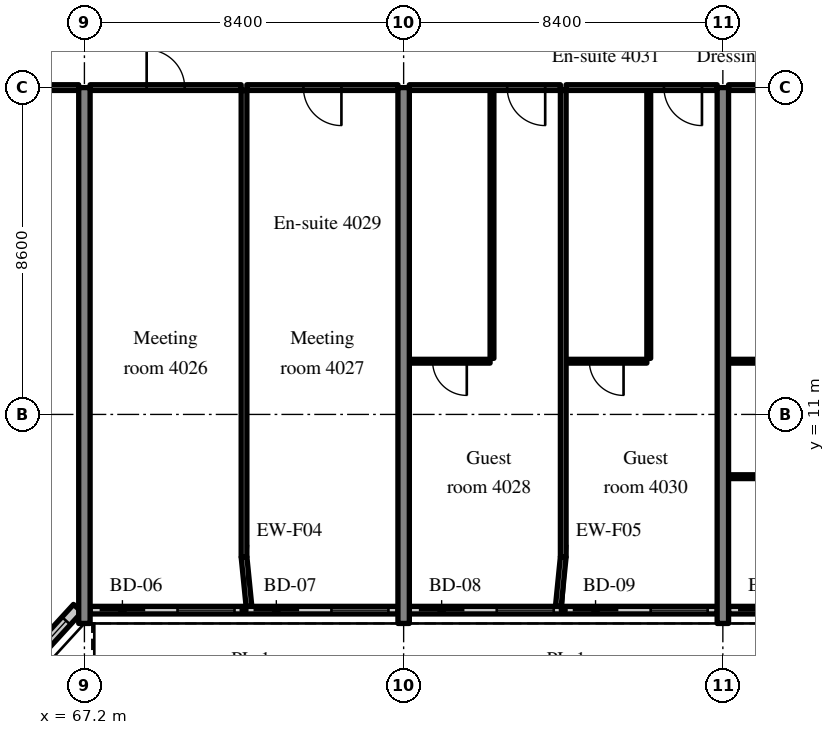
"""IFC4 building model, lengths in metres.
Left out: names, types, materials, properties, quantities, classifications, styles, units other than length and angle.
Written with IfcOpenShell. Run it as: python <this file> out.ifc"""

import sys

from ifc_helpers import new_model, si_unit, direction, frame, frame_2d, origin, place, context, subcontext, project, spatial, rectangle, extrude, source, transform, mapped, element, fill, save


model = new_model("IFC4")
c1 = context("Model", 3, precision=1e-05, world=origin(), true_north=direction((0.0, 1.0)))
c2 = subcontext(c1, "Body", "Model", "MODEL_VIEW")
j1 = project(units=[si_unit("LENGTHUNIT", "METRE"), si_unit("PLANEANGLEUNIT", "RADIAN")], contexts=[c1])
p1 = place(None, origin())
s1 = spatial("IfcSite", under=j1, at=p1, CompositionType="ELEMENT")
p2 = place(p1, origin())
s2 = spatial("IfcBuilding", under=s1, at=p2, CompositionType="ELEMENT")
p3 = place(p2, frame((0.0, 0.0, 166.8)))
s3 = spatial("IfcBuildingStorey", under=s2, at=p3, CompositionType="ELEMENT", Elevation=166.8)
m1 = source(origin(), c2, "Body", "SweptSolid", [
    extrude(rectangle(XDim=14.1, YDim=0.3, at=frame_2d((7.05, 0.0))), origin(), (0.0, 0.0, 1.0), 3.52),
])
for number, where, z_axis, x_axis in (
    (1, (67.2, 5.5, 0.0), (0.0, 0.0, 1.0), (0.0, 1.0, 0.0)),
    (2, (75.6, 5.5, 0.0), (0.0, 0.0, 1.0), (0.0, 1.0, 0.0)),
    (3, (84.0, 5.5, 0.0), (0.0, 0.0, 1.0), (0.0, 1.0, 0.0)),
):
    element("IfcWall", number, at=place(p3, frame(where, z_axis=z_axis, x_axis=x_axis)), inside=s3, PredefinedType="SHEAR", context=c2, shape_type="MappedRepresentation", body=[
        mapped(m1, transform((0.0, 0.0, 0.0), scale=1.0)),
    ])
m2 = source(origin(), c2, "Body", "SweptSolid", [
    extrude(rectangle(XDim=2.398, YDim=0.3, at=frame_2d((1.199, 0.0))), origin(), (0.0, 0.0, 1.0), 3.52),
])
p4 = place(p3, frame((65.404, 4.131, 0.0), z_axis=(0.0, 0.0, 1.0), x_axis=(0.675374189419, 0.737475222815, 0.0)))
e4 = element("IfcWall", 4, at=p4, inside=s3, PredefinedType="SOLIDWALL", context=c2, shape_type="MappedRepresentation", body=[
    mapped(m2, transform((0.0, 0.0, 0.0), scale=1.0)),
])
m3 = source(origin(), c2, "Body", "SweptSolid", [
    extrude(rectangle(XDim=1.5, YDim=2.0, at=frame_2d((0.75, 1.0))), frame((0.0, 0.16, 0.0), z_axis=(0.0, -1.0, 0.0), x_axis=(1.0, 0.0, 0.0)), (0.0, 0.0, 1.0), 0.32),
])
p5 = place(p4, frame((0.449, 0.0, 0.9)))
e5 = element("IfcOpeningElement", 5, at=p5, cuts=e4, PredefinedType="OPENING", context=c2, shape_type="MappedRepresentation", body=[
    mapped(m3, transform((0.0, 0.0, 0.0), scale=1.0)),
])
m4 = source(origin(), c2, "Body", "SweptSolid", [
    extrude(rectangle(XDim=8.1, YDim=0.2, at=frame_2d((4.05, 0.0))), origin(), (0.0, 0.0, 1.0), 2.87),
])
p6 = place(p3, frame((67.35, 5.85, 0.0), z_axis=(0.0, 0.0, 1.0), x_axis=(1.0, 0.0, 0.0)))
e6 = element("IfcWall", 6, at=p6, inside=s3, PredefinedType="SOLIDWALL", context=c2, shape_type="MappedRepresentation", body=[
    mapped(m4, transform((0.0, 0.0, 0.0), scale=1.0)),
])
m5 = source(origin(), c2, "Body", "SweptSolid", [
    extrude(rectangle(XDim=1.2, YDim=2.4, at=frame_2d((0.6, 1.2))), frame((0.0, 0.11, 0.0), z_axis=(0.0, -1.0, 0.0), x_axis=(1.0, 0.0, 0.0)), (0.0, 0.0, 1.0), 0.22),
])
p7 = place(p6, frame((0.25, 0.0, 0.0)))
e7 = element("IfcOpeningElement", 7, at=p7, cuts=e6, PredefinedType="OPENING", context=c2, shape_type="MappedRepresentation", body=[
    mapped(m5, transform((0.0, 0.0, 0.0), scale=1.0)),
])
m6 = source(origin(), c2, "Body", "SweptSolid", [
    extrude(rectangle(XDim=1.5, YDim=1.5, at=frame_2d((0.75, 0.75))), frame((0.0, 0.11, 0.0), z_axis=(0.0, -1.0, 0.0), x_axis=(1.0, 0.0, 0.0)), (0.0, 0.0, 1.0), 0.22),
])
p8 = place(p6, frame((2.3, 0.0, 0.9)))
e8 = element("IfcOpeningElement", 8, at=p8, cuts=e6, PredefinedType="OPENING", context=c2, shape_type="MappedRepresentation", body=[
    mapped(m6, transform((0.0, 0.0, 0.0), scale=1.0)),
])
p9 = place(p6, frame((4.3, 0.0, 0.0)))
e9 = element("IfcOpeningElement", 9, at=p9, cuts=e6, PredefinedType="OPENING", context=c2, shape_type="MappedRepresentation", body=[
    mapped(m5, transform((0.0, 0.0, 0.0), scale=1.0)),
])
p10 = place(p6, frame((6.35, 0.0, 0.9)))
e10 = element("IfcOpeningElement", 10, at=p10, cuts=e6, PredefinedType="OPENING", context=c2, shape_type="MappedRepresentation", body=[
    mapped(m6, transform((0.0, 0.0, 0.0), scale=1.0)),
])
m7 = source(origin(), c2, "Body", "SweptSolid", [
    extrude(rectangle(XDim=8.1, YDim=0.2, at=frame_2d((4.05, 0.0))), origin(), (0.0, 0.0, 1.0), 2.87),
])
p11 = place(p3, frame((75.75, 5.85, 0.0), z_axis=(0.0, 0.0, 1.0), x_axis=(1.0, 0.0, 0.0)))
e11 = element("IfcWall", 11, at=p11, inside=s3, PredefinedType="SOLIDWALL", context=c2, shape_type="MappedRepresentation", body=[
    mapped(m7, transform((0.0, 0.0, 0.0), scale=1.0)),
])
p12 = place(p11, frame((0.25, 0.0, 0.0)))
e12 = element("IfcOpeningElement", 12, at=p12, cuts=e11, PredefinedType="OPENING", context=c2, shape_type="MappedRepresentation", body=[
    mapped(m5, transform((0.0, 0.0, 0.0), scale=1.0)),
])
p13 = place(p11, frame((2.3, 0.0, 0.9)))
e13 = element("IfcOpeningElement", 13, at=p13, cuts=e11, PredefinedType="OPENING", context=c2, shape_type="MappedRepresentation", body=[
    mapped(m6, transform((0.0, 0.0, 0.0), scale=1.0)),
])
p14 = place(p11, frame((4.3, 0.0, 0.0)))
e14 = element("IfcOpeningElement", 14, at=p14, cuts=e11, PredefinedType="OPENING", context=c2, shape_type="MappedRepresentation", body=[
    mapped(m5, transform((0.0, 0.0, 0.0), scale=1.0)),
])
p15 = place(p11, frame((6.35, 0.0, 0.9)))
e15 = element("IfcOpeningElement", 15, at=p15, cuts=e11, PredefinedType="OPENING", context=c2, shape_type="MappedRepresentation", body=[
    mapped(m6, transform((0.0, 0.0, 0.0), scale=1.0)),
])
m8 = source(origin(), c2, "Body", "SweptSolid", [
    extrude(rectangle(XDim=4.105, YDim=0.2, at=frame_2d((2.052, 0.0))), origin(), (0.0, 0.0, 1.0), 2.87),
])
p16 = place(p3, frame((84.15, 5.85, 0.0), z_axis=(0.0, 0.0, 1.0), x_axis=(1.0, 0.0, 0.0)))
e16 = element("IfcWall", 16, at=p16, inside=s3, PredefinedType="SOLIDWALL", context=c2, shape_type="MappedRepresentation", body=[
    mapped(m8, transform((0.0, 0.0, 0.0), scale=1.0)),
])
p17 = place(p16, frame((0.25, 0.0, 0.0)))
e17 = element("IfcOpeningElement", 17, at=p17, cuts=e16, PredefinedType="OPENING", context=c2, shape_type="MappedRepresentation", body=[
    mapped(m5, transform((0.0, 0.0, 0.0), scale=1.0)),
])
p18 = place(p16, frame((2.355, 0.0, 0.9)))
e18 = element("IfcOpeningElement", 18, at=p18, cuts=e16, PredefinedType="OPENING", context=c2, shape_type="MappedRepresentation", body=[
    mapped(m6, transform((0.0, 0.0, 0.0), scale=1.0)),
])
m9 = source(origin(), c2, "Body", "SweptSolid", [
    extrude(rectangle(XDim=3.975, YDim=0.15, at=frame_2d((1.988, 0.0))), origin(), (0.0, 0.0, 1.0), 2.82),
])
p19 = place(p3, frame((63.075, 19.6, 0.0), z_axis=(0.0, 0.0, 1.0), x_axis=(1.0, 0.0, 0.0)))
e19 = element("IfcWall", 19, at=p19, inside=s3, PredefinedType="PARTITIONING", context=c2, shape_type="MappedRepresentation", body=[
    mapped(m9, transform((0.0, 0.0, 0.0), scale=1.0)),
])
m10 = source(origin(), c2, "Body", "SweptSolid", [
    extrude(rectangle(XDim=1.0, YDim=2.1, at=frame_2d((0.5, 1.05))), frame((0.0, 0.085, 0.0), z_axis=(0.0, -1.0, 0.0), x_axis=(1.0, 0.0, 0.0)), (0.0, 0.0, 1.0), 0.17),
])
p20 = place(p19, frame((1.487, 0.0, 0.0)))
e20 = element("IfcOpeningElement", 20, at=p20, cuts=e19, PredefinedType="OPENING", context=c2, shape_type="MappedRepresentation", body=[
    mapped(m10, transform((0.0, 0.0, 0.0), scale=1.0)),
])
m11 = source(origin(), c2, "Body", "SweptSolid", [
    extrude(rectangle(XDim=3.975, YDim=0.15, at=frame_2d((1.987, 0.0))), origin(), (0.0, 0.0, 1.0), 2.82),
])
p21 = place(p3, frame((67.35, 19.6, 0.0), z_axis=(0.0, 0.0, 1.0), x_axis=(1.0, 0.0, 0.0)))
e21 = element("IfcWall", 21, at=p21, inside=s3, PredefinedType="PARTITIONING", context=c2, shape_type="MappedRepresentation", body=[
    mapped(m11, transform((0.0, 0.0, 0.0), scale=1.0)),
])
p22 = place(p21, frame((1.488, 0.0, 0.0)))
e22 = element("IfcOpeningElement", 22, at=p22, cuts=e21, PredefinedType="OPENING", context=c2, shape_type="MappedRepresentation", body=[
    mapped(m10, transform((0.0, 0.0, 0.0), scale=1.0)),
])
p23 = place(p3, frame((71.475, 19.6, 0.0), z_axis=(0.0, 0.0, 1.0), x_axis=(1.0, 0.0, 0.0)))
e23 = element("IfcWall", 23, at=p23, inside=s3, PredefinedType="PARTITIONING", context=c2, shape_type="MappedRepresentation", body=[
    mapped(m11, transform((0.0, 0.0, 0.0), scale=1.0)),
])
p24 = place(p23, frame((1.488, 0.0, 0.0)))
e24 = element("IfcOpeningElement", 24, at=p24, cuts=e23, PredefinedType="OPENING", context=c2, shape_type="MappedRepresentation", body=[
    mapped(m10, transform((0.0, 0.0, 0.0), scale=1.0)),
])
m12 = source(origin(), c2, "Body", "SweptSolid", [
    extrude(rectangle(XDim=12.275, YDim=0.15, at=frame_2d((6.137, 0.0))), origin(), (0.0, 0.0, 1.0), 3.52),
])
p25 = place(p3, frame((71.4, 7.25, 0.0), z_axis=(0.0, 0.0, 1.0), x_axis=(0.0, 1.0, 0.0)))
e25 = element("IfcWall", 25, at=p25, inside=s3, PredefinedType="PARTITIONING", context=c2, shape_type="MappedRepresentation", body=[
    mapped(m12, transform((0.0, 0.0, 0.0), scale=1.0)),
])
m13 = source(origin(), c2, "Body", "SweptSolid", [
    extrude(rectangle(XDim=7.05, YDim=0.1, at=frame_2d((3.525, 0.0))), origin(), (0.0, 0.0, 1.0), 3.52),
])
p26 = place(p3, frame((77.925, 12.475, 0.0), z_axis=(0.0, 0.0, 1.0), x_axis=(0.0, 1.0, 0.0)))
e26 = element("IfcWall", 26, at=p26, inside=s3, PredefinedType="PARTITIONING", context=c2, shape_type="MappedRepresentation", body=[
    mapped(m13, transform((0.0, 0.0, 0.0), scale=1.0)),
])
m14 = source(origin(), c2, "Body", "SweptSolid", [
    extrude(rectangle(XDim=2.125, YDim=0.1, at=frame_2d((1.062, 0.0))), origin(), (0.0, 0.0, 1.0), 3.52),
])
p27 = place(p3, frame((75.75, 12.4, 0.0), z_axis=(0.0, 0.0, 1.0), x_axis=(1.0, 0.0, 0.0)))
e27 = element("IfcWall", 27, at=p27, inside=s3, PredefinedType="PARTITIONING", context=c2, shape_type="MappedRepresentation", body=[
    mapped(m14, transform((0.0, 0.0, 0.0), scale=1.0)),
])
m15 = source(origin(), c2, "Body", "SweptSolid", [
    extrude(rectangle(XDim=0.9, YDim=2.1, at=frame_2d((0.45, 1.05))), frame((0.0, 0.06, 0.0), z_axis=(0.0, -1.0, 0.0), x_axis=(1.0, 0.0, 0.0)), (0.0, 0.0, 1.0), 0.12),
])
p28 = place(p27, frame((0.612, 0.0, 0.0)))
e28 = element("IfcOpeningElement", 28, at=p28, cuts=e27, PredefinedType="OPENING", context=c2, shape_type="MappedRepresentation", body=[
    mapped(m15, transform((0.0, 0.0, 0.0), scale=1.0)),
])
p29 = place(p3, frame((75.75, 19.6, 0.0), z_axis=(0.0, 0.0, 1.0), x_axis=(1.0, 0.0, 0.0)))
e29 = element("IfcWall", 29, at=p29, inside=s3, PredefinedType="PARTITIONING", context=c2, shape_type="MappedRepresentation", body=[
    mapped(m9, transform((0.0, 0.0, 0.0), scale=1.0)),
])
p30 = place(p29, frame((2.575, 0.0, 0.0)))
e30 = element("IfcOpeningElement", 30, at=p30, cuts=e29, PredefinedType="OPENING", context=c2, shape_type="MappedRepresentation", body=[
    mapped(m10, transform((0.0, 0.0, 0.0), scale=1.0)),
])
p31 = place(p3, frame((82.05, 12.475, 0.0), z_axis=(0.0, 0.0, 1.0), x_axis=(0.0, 1.0, 0.0)))
e31 = element("IfcWall", 31, at=p31, inside=s3, PredefinedType="PARTITIONING", context=c2, shape_type="MappedRepresentation", body=[
    mapped(m13, transform((0.0, 0.0, 0.0), scale=1.0)),
])
p32 = place(p3, frame((79.875, 12.4, 0.0), z_axis=(0.0, 0.0, 1.0), x_axis=(1.0, 0.0, 0.0)))
e32 = element("IfcWall", 32, at=p32, inside=s3, PredefinedType="PARTITIONING", context=c2, shape_type="MappedRepresentation", body=[
    mapped(m14, transform((0.0, 0.0, 0.0), scale=1.0)),
])
p33 = place(p32, frame((0.612, 0.0, 0.0)))
e33 = element("IfcOpeningElement", 33, at=p33, cuts=e32, PredefinedType="OPENING", context=c2, shape_type="MappedRepresentation", body=[
    mapped(m15, transform((0.0, 0.0, 0.0), scale=1.0)),
])
p34 = place(p3, frame((79.875, 19.6, 0.0), z_axis=(0.0, 0.0, 1.0), x_axis=(1.0, 0.0, 0.0)))
e34 = element("IfcWall", 34, at=p34, inside=s3, PredefinedType="PARTITIONING", context=c2, shape_type="MappedRepresentation", body=[
    mapped(m9, transform((0.0, 0.0, 0.0), scale=1.0)),
])
p35 = place(p34, frame((2.575, 0.0, 0.0)))
e35 = element("IfcOpeningElement", 35, at=p35, cuts=e34, PredefinedType="OPENING", context=c2, shape_type="MappedRepresentation", body=[
    mapped(m10, transform((0.0, 0.0, 0.0), scale=1.0)),
])
p36 = place(p3, frame((79.8, 7.25, 0.0), z_axis=(0.0, 0.0, 1.0), x_axis=(0.0, 1.0, 0.0)))
e36 = element("IfcWall", 36, at=p36, inside=s3, PredefinedType="PARTITIONING", context=c2, shape_type="MappedRepresentation", body=[
    mapped(m12, transform((0.0, 0.0, 0.0), scale=1.0)),
])
m16 = source(origin(), c2, "Body", "SweptSolid", [
    extrude(rectangle(XDim=2.5, YDim=0.1, at=frame_2d((1.25, 0.0))), origin(), (0.0, 0.0, 1.0), 3.52),
])
p37 = place(p3, frame((84.15, 12.4, 0.0), z_axis=(0.0, 0.0, 1.0), x_axis=(1.0, 0.0, 0.0)))
e37 = element("IfcWall", 37, at=p37, inside=s3, PredefinedType="PARTITIONING", context=c2, shape_type="MappedRepresentation", body=[
    mapped(m16, transform((0.0, 0.0, 0.0), scale=1.0)),
])
p38 = place(p37, frame((0.8, 0.0, 0.0)))
e38 = element("IfcOpeningElement", 38, at=p38, cuts=e37, PredefinedType="OPENING", context=c2, shape_type="MappedRepresentation", body=[
    mapped(m15, transform((0.0, 0.0, 0.0), scale=1.0)),
])
m17 = source(origin(), c2, "Body", "SweptSolid", [
    extrude(rectangle(XDim=7.95, YDim=0.1, at=frame_2d((3.975, 0.0))), origin(), (0.0, 0.0, 1.0), 3.52),
])
p39 = place(p3, frame((84.15, 9.362, 0.0), z_axis=(0.0, 0.0, 1.0), x_axis=(1.0, 0.0, 0.0)))
e39 = element("IfcWall", 39, at=p39, inside=s3, PredefinedType="PARTITIONING", context=c2, shape_type="MappedRepresentation", body=[
    mapped(m17, transform((0.0, 0.0, 0.0), scale=1.0)),
])
m18 = source(origin(), c2, "Body", "SweptSolid", [
    extrude(rectangle(XDim=1.8, YDim=2.1, at=frame_2d((0.9, 1.05))), frame((0.0, 0.06, 0.0), z_axis=(0.0, -1.0, 0.0), x_axis=(1.0, 0.0, 0.0)), (0.0, 0.0, 1.0), 0.12),
])
p40 = place(p39, frame((3.075, 0.0, 0.0)))
e40 = element("IfcOpeningElement", 40, at=p40, cuts=e39, PredefinedType="OPENING", context=c2, shape_type="MappedRepresentation", body=[
    mapped(m18, transform((0.0, 0.0, 0.0), scale=1.0)),
])
m19 = source(origin(), c2, "Body", "SweptSolid", [
    extrude(rectangle(XDim=7.95, YDim=0.15, at=frame_2d((3.975, 0.0))), origin(), (0.0, 0.0, 1.0), 2.82),
])
p41 = place(p3, frame((84.15, 19.6, 0.0), z_axis=(0.0, 0.0, 1.0), x_axis=(1.0, 0.0, 0.0)))
e41 = element("IfcWall", 41, at=p41, inside=s3, PredefinedType="PARTITIONING", context=c2, shape_type="MappedRepresentation", body=[
    mapped(m19, transform((0.0, 0.0, 0.0), scale=1.0)),
])
p42 = place(p41, frame((6.55, 0.0, 0.0)))
e42 = element("IfcOpeningElement", 42, at=p42, cuts=e41, PredefinedType="OPENING", context=c2, shape_type="MappedRepresentation", body=[
    mapped(m10, transform((0.0, 0.0, 0.0), scale=1.0)),
])
m20 = source(origin(), c2, "Body", "SweptSolid", [
    extrude(rectangle(XDim=1.307, YDim=0.15, at=frame_2d((0.653, 0.0))), origin(), (0.0, 0.0, 1.0), 3.52),
])
for number, where, z_axis, x_axis in (
    (43, (71.53, 5.95, 0.0), (0.0, 0.0, 1.0), (-0.1, 0.995, 0.0)),
    (44, (79.67, 5.95, 0.0), (0.0, 0.0, 1.0), (0.1, 0.995, 0.0)),
):
    element("IfcWall", number, at=place(p3, frame(where, z_axis=z_axis, x_axis=x_axis)), inside=s3, PredefinedType="PARTITIONING", context=c2, shape_type="MappedRepresentation", body=[
        mapped(m20, transform((0.0, 0.0, 0.0), scale=1.0)),
    ])
m21 = source(origin(), c2, "Body", "SweptSolid", [
    extrude(rectangle(XDim=1.5, YDim=2.0, at=frame_2d((0.75, 1.0))), frame((0.0, 0.03, 0.0), z_axis=(0.0, -1.0, 0.0), x_axis=(1.0, 0.0, 0.0)), (0.0, 0.0, 1.0), 0.06),
])
p43 = place(p5, origin())
e45 = element("IfcWindow", 45, at=p43, inside=s3, PartitioningType="SINGLE_PANEL", PredefinedType="WINDOW", context=c2, shape_type="MappedRepresentation", body=[
    mapped(m21, transform((0.0, 0.0, 0.0), scale=1.0)),
])
fill(e5, e45)
m22 = source(origin(), c2, "Body", "SweptSolid", [
    extrude(rectangle(XDim=1.2, YDim=2.4, at=frame_2d((0.6, 1.2))), frame((0.0, 0.025, 0.0), z_axis=(0.0, -1.0, 0.0), x_axis=(1.0, 0.0, 0.0)), (0.0, 0.0, 1.0), 0.05),
])
p44 = place(p7, origin())
e46 = element("IfcDoor", 46, at=p44, inside=s3, OperationType="SLIDING_TO_RIGHT", PredefinedType="DOOR", context=c2, shape_type="MappedRepresentation", body=[
    mapped(m22, transform((0.0, 0.0, 0.0), scale=1.0)),
])
fill(e7, e46)
m23 = source(origin(), c2, "Body", "SweptSolid", [
    extrude(rectangle(XDim=1.5, YDim=1.5, at=frame_2d((0.75, 0.75))), frame((0.0, 0.03, 0.0), z_axis=(0.0, -1.0, 0.0), x_axis=(1.0, 0.0, 0.0)), (0.0, 0.0, 1.0), 0.06),
])
p45 = place(p8, origin())
e47 = element("IfcWindow", 47, at=p45, inside=s3, PartitioningType="SINGLE_PANEL", PredefinedType="WINDOW", context=c2, shape_type="MappedRepresentation", body=[
    mapped(m23, transform((0.0, 0.0, 0.0), scale=1.0)),
])
fill(e8, e47)
p46 = place(p9, origin())
e48 = element("IfcDoor", 48, at=p46, inside=s3, OperationType="SLIDING_TO_LEFT", PredefinedType="DOOR", context=c2, shape_type="MappedRepresentation", body=[
    mapped(m22, transform((0.0, 0.0, 0.0), scale=1.0)),
])
fill(e9, e48)
p47 = place(p10, origin())
e49 = element("IfcWindow", 49, at=p47, inside=s3, PartitioningType="SINGLE_PANEL", PredefinedType="WINDOW", context=c2, shape_type="MappedRepresentation", body=[
    mapped(m23, transform((0.0, 0.0, 0.0), scale=1.0)),
])
fill(e10, e49)
p48 = place(p12, origin())
e50 = element("IfcDoor", 50, at=p48, inside=s3, OperationType="SLIDING_TO_RIGHT", PredefinedType="DOOR", context=c2, shape_type="MappedRepresentation", body=[
    mapped(m22, transform((0.0, 0.0, 0.0), scale=1.0)),
])
fill(e12, e50)
p49 = place(p13, origin())
e51 = element("IfcWindow", 51, at=p49, inside=s3, PartitioningType="SINGLE_PANEL", PredefinedType="WINDOW", context=c2, shape_type="MappedRepresentation", body=[
    mapped(m23, transform((0.0, 0.0, 0.0), scale=1.0)),
])
fill(e13, e51)
p50 = place(p14, origin())
e52 = element("IfcDoor", 52, at=p50, inside=s3, OperationType="SLIDING_TO_LEFT", PredefinedType="DOOR", context=c2, shape_type="MappedRepresentation", body=[
    mapped(m22, transform((0.0, 0.0, 0.0), scale=1.0)),
])
fill(e14, e52)
p51 = place(p15, origin())
e53 = element("IfcWindow", 53, at=p51, inside=s3, PartitioningType="SINGLE_PANEL", PredefinedType="WINDOW", context=c2, shape_type="MappedRepresentation", body=[
    mapped(m23, transform((0.0, 0.0, 0.0), scale=1.0)),
])
fill(e15, e53)
p52 = place(p17, origin())
e54 = element("IfcDoor", 54, at=p52, inside=s3, OperationType="SLIDING_TO_RIGHT", PredefinedType="DOOR", context=c2, shape_type="MappedRepresentation", body=[
    mapped(m22, transform((0.0, 0.0, 0.0), scale=1.0)),
])
fill(e17, e54)
m24 = source(origin(), c2, "Body", "SweptSolid", [
    extrude(rectangle(XDim=1.0, YDim=2.1, at=frame_2d((0.5, 1.05))), frame((0.0, 0.025, 0.0), z_axis=(0.0, -1.0, 0.0), x_axis=(1.0, 0.0, 0.0)), (0.0, 0.0, 1.0), 0.05),
])
p53 = place(p22, origin())
e55 = element("IfcDoor", 55, at=p53, inside=s3, OperationType="SINGLE_SWING_LEFT", PredefinedType="DOOR", context=c2, shape_type="MappedRepresentation", body=[
    mapped(m24, transform((0.0, 0.0, 0.0), scale=1.0)),
])
fill(e22, e55)
p54 = place(p24, origin())
e56 = element("IfcDoor", 56, at=p54, inside=s3, OperationType="SINGLE_SWING_RIGHT", PredefinedType="DOOR", context=c2, shape_type="MappedRepresentation", body=[
    mapped(m24, transform((0.0, 0.0, 0.0), scale=1.0)),
])
fill(e24, e56)
m25 = source(origin(), c2, "Body", "SweptSolid", [
    extrude(rectangle(XDim=0.9, YDim=2.1, at=frame_2d((0.45, 1.05))), frame((0.0, 0.025, 0.0), z_axis=(0.0, -1.0, 0.0), x_axis=(1.0, 0.0, 0.0)), (0.0, 0.0, 1.0), 0.05),
])
p55 = place(p28, origin())
e57 = element("IfcDoor", 57, at=p55, inside=s3, OperationType="SINGLE_SWING_RIGHT", PredefinedType="DOOR", context=c2, shape_type="MappedRepresentation", body=[
    mapped(m25, transform((0.0, 0.0, 0.0), scale=1.0)),
])
fill(e28, e57)
p56 = place(p30, origin())
e58 = element("IfcDoor", 58, at=p56, inside=s3, OperationType="SINGLE_SWING_RIGHT", PredefinedType="DOOR", context=c2, shape_type="MappedRepresentation", body=[
    mapped(m24, transform((0.0, 0.0, 0.0), scale=1.0)),
])
fill(e30, e58)
p57 = place(p33, origin())
e59 = element("IfcDoor", 59, at=p57, inside=s3, OperationType="SINGLE_SWING_RIGHT", PredefinedType="DOOR", context=c2, shape_type="MappedRepresentation", body=[
    mapped(m25, transform((0.0, 0.0, 0.0), scale=1.0)),
])
fill(e33, e59)
p58 = place(p35, origin())
e60 = element("IfcDoor", 60, at=p58, inside=s3, OperationType="SINGLE_SWING_RIGHT", PredefinedType="DOOR", context=c2, shape_type="MappedRepresentation", body=[
    mapped(m24, transform((0.0, 0.0, 0.0), scale=1.0)),
])
fill(e35, e60)
save(model, sys.argv[1])
